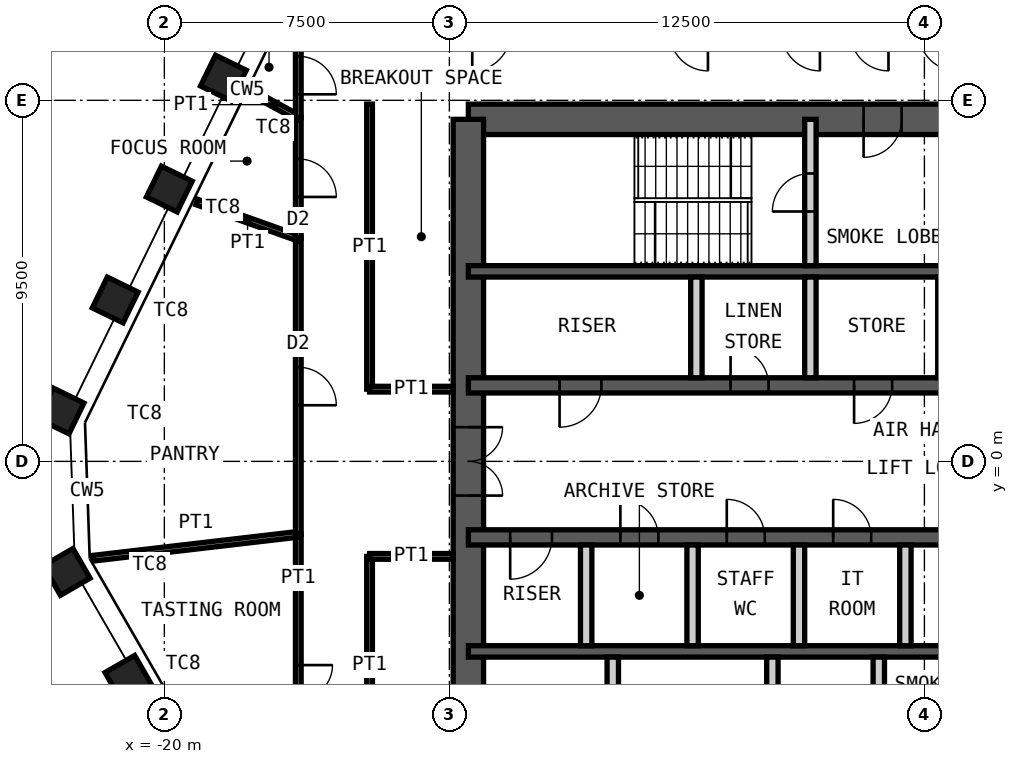
"""IFC4 building model, lengths in metres.
Left out: names, types, materials, properties, quantities, classifications, styles, units other than length and angle.
Written with IfcOpenShell. Run it as: python <this file> out.ifc"""

import sys

from ifc_helpers import new_model, si_unit, direction, frame, frame_2d, origin, origin_2d, place, context, subcontext, project, spatial, rectangle, hollow_rectangle, extrude, element, fill, save


model = new_model("IFC4")
c1 = context("Model", 3, precision=1e-05, world=origin(), true_north=direction((0.0, 1.0)))
c2 = subcontext(c1, "Body", "Model", "MODEL_VIEW")
j1 = project(units=[si_unit("LENGTHUNIT", "METRE"), si_unit("PLANEANGLEUNIT", "RADIAN")], contexts=[c1])
p1 = place(None, origin())
s1 = spatial("IfcSite", under=j1, at=p1, CompositionType="ELEMENT")
p2 = place(p1, origin())
s2 = spatial("IfcBuilding", under=s1, at=p2, CompositionType="ELEMENT")
p3 = place(p2, frame((0.0, 0.0, 316.6)))
s3 = spatial("IfcBuildingStorey", under=s2, at=p3, CompositionType="ELEMENT", Elevation=316.6)
for number, where, z_axis, x_axis in (
    (1, (-20.946, -5.721, 0.0), (0.0, 0.0, 1.0), (0.5, -0.866, 0.0)),
    (2, (-22.57, -2.908, 0.0), (0.0, 0.0, 1.0), (0.5, -0.866, 0.0)),
    (3, (-22.717, 1.327, 0.0), (0.0, 0.0, 1.0), (-0.438, -0.899, 0.0)),
    (4, (-21.293, 4.246, 0.0), (0.0, 0.0, 1.0), (-0.438, -0.899, 0.0)),
    (5, (-19.87, 7.166, 0.0), (0.0, 0.0, 1.0), (-0.438, -0.899, 0.0)),
    (6, (-18.446, 10.085, 0.0), (0.0, 0.0, 1.0), (-0.438, -0.899, 0.0)),
):
    element("IfcColumn", number, at=place(p3, frame(where, z_axis=z_axis, x_axis=x_axis)), inside=s3, PredefinedType="COLUMN", context=c2, shape_type="SweptSolid", body=[
        extrude(hollow_rectangle(XDim=0.9, YDim=0.9, WallThickness=0.05, at=origin_2d()), origin(), (0.0, 0.0, 1.0), 4.2),
    ])
p4 = place(p3, frame((-12.0, 9.0, 0.0), z_axis=(0.0, 0.0, 1.0), x_axis=(1.0, 0.0, 0.0)))
e7 = element("IfcWall", 7, at=p4, inside=s3, PredefinedType="SHEAR", context=c2, shape_type="SweptSolid", body=[
    extrude(rectangle(XDim=24.0, YDim=0.8, at=frame_2d((12.0, 0.0))), origin(), (0.0, 0.0, 1.0), 4.2),
])
p5 = place(p4, frame((10.4, 0.0, 0.0)))
e8 = element("IfcOpeningElement", 8, at=p5, cuts=e7, PredefinedType="OPENING", context=c2, shape_type="SweptSolid", body=[
    extrude(rectangle(XDim=1.0, YDim=2.1, at=frame_2d((0.5, 1.05))), frame((0.0, 0.41, 0.0), z_axis=(0.0, -1.0, 0.0), x_axis=(1.0, 0.0, 0.0)), (0.0, 0.0, 1.0), 0.82),
])
p6 = place(p4, frame((17.6, 0.0, 0.0)))
e9 = element("IfcOpeningElement", 9, at=p6, cuts=e7, PredefinedType="OPENING", context=c2, shape_type="SweptSolid", body=[
    extrude(rectangle(XDim=0.9, YDim=2.1, at=frame_2d((0.45, 1.05))), frame((0.0, 0.41, 0.0), z_axis=(0.0, -1.0, 0.0), x_axis=(1.0, 0.0, 0.0)), (0.0, 0.0, 1.0), 0.82),
])
p7 = place(p4, frame((21.9, 0.0, 0.0)))
e10 = element("IfcOpeningElement", 10, at=p7, cuts=e7, PredefinedType="OPENING", context=c2, shape_type="SweptSolid", body=[
    extrude(rectangle(XDim=0.9, YDim=2.1, at=frame_2d((0.45, 1.05))), frame((0.0, 0.41, 0.0), z_axis=(0.0, -1.0, 0.0), x_axis=(1.0, 0.0, 0.0)), (0.0, 0.0, 1.0), 0.82),
])
p8 = place(p3, frame((-12.0, -9.0, 0.0), z_axis=(0.0, 0.0, 1.0), x_axis=(0.0, 1.0, 0.0)))
e11 = element("IfcWall", 11, at=p8, inside=s3, PredefinedType="SHEAR", context=c2, shape_type="SweptSolid", body=[
    extrude(rectangle(XDim=18.0, YDim=0.8, at=frame_2d((9.0, 0.0))), origin(), (0.0, 0.0, 1.0), 4.2),
])
p9 = place(p8, frame((8.1, 0.0, 0.0)))
e12 = element("IfcOpeningElement", 12, at=p9, cuts=e11, PredefinedType="OPENING", context=c2, shape_type="SweptSolid", body=[
    extrude(rectangle(XDim=1.8, YDim=2.1, at=frame_2d((0.9, 1.05))), frame((0.0, 0.41, 0.0), z_axis=(0.0, -1.0, 0.0), x_axis=(1.0, 0.0, 0.0)), (0.0, 0.0, 1.0), 0.82),
])
p10 = place(p3, frame((-12.0, 5.0, 0.0), z_axis=(0.0, 0.0, 1.0), x_axis=(1.0, 0.0, 0.0)))
e13 = element("IfcWall", 13, at=p10, inside=s3, PredefinedType="SHEAR", context=c2, shape_type="SweptSolid", body=[
    extrude(rectangle(XDim=24.0, YDim=0.3, at=frame_2d((12.0, 0.0))), origin(), (0.0, 0.0, 1.0), 4.2),
])
p11 = place(p3, frame((-12.0, 2.0, 0.0), z_axis=(0.0, 0.0, 1.0), x_axis=(1.0, 0.0, 0.0)))
e14 = element("IfcWall", 14, at=p11, inside=s3, PredefinedType="SHEAR", context=c2, shape_type="SweptSolid", body=[
    extrude(rectangle(XDim=24.0, YDim=0.4, at=frame_2d((12.0, 0.0))), origin(), (0.0, 0.0, 1.0), 4.2),
])
p12 = place(p11, frame((2.4, 0.0, 0.0)))
e15 = element("IfcOpeningElement", 15, at=p12, cuts=e14, PredefinedType="OPENING", context=c2, shape_type="SweptSolid", body=[
    extrude(rectangle(XDim=1.1, YDim=2.1, at=frame_2d((0.55, 1.05))), frame((0.0, 0.21, 0.0), z_axis=(0.0, -1.0, 0.0), x_axis=(1.0, 0.0, 0.0)), (0.0, 0.0, 1.0), 0.42),
])
p13 = place(p11, frame((22.0, 0.0, 0.0)))
e16 = element("IfcOpeningElement", 16, at=p13, cuts=e14, PredefinedType="OPENING", context=c2, shape_type="SweptSolid", body=[
    extrude(rectangle(XDim=1.1, YDim=2.1, at=frame_2d((0.55, 1.05))), frame((0.0, 0.21, 0.0), z_axis=(0.0, -1.0, 0.0), x_axis=(1.0, 0.0, 0.0)), (0.0, 0.0, 1.0), 0.42),
])
p14 = place(p11, frame((10.15, 0.0, 0.0)))
e17 = element("IfcOpeningElement", 17, at=p14, cuts=e14, PredefinedType="OPENING", context=c2, shape_type="SweptSolid", body=[
    extrude(rectangle(XDim=1.0, YDim=2.1, at=frame_2d((0.5, 1.05))), frame((0.0, 0.21, 0.0), z_axis=(0.0, -1.0, 0.0), x_axis=(1.0, 0.0, 0.0)), (0.0, 0.0, 1.0), 0.42),
])
p15 = place(p11, frame((6.9, 0.0, 0.0)))
e18 = element("IfcOpeningElement", 18, at=p15, cuts=e14, PredefinedType="OPENING", context=c2, shape_type="SweptSolid", body=[
    extrude(rectangle(XDim=1.0, YDim=2.1, at=frame_2d((0.5, 1.05))), frame((0.0, 0.21, 0.0), z_axis=(0.0, -1.0, 0.0), x_axis=(1.0, 0.0, 0.0)), (0.0, 0.0, 1.0), 0.42),
])
p16 = place(p11, frame((13.35, 0.0, 0.0)))
e19 = element("IfcOpeningElement", 19, at=p16, cuts=e14, PredefinedType="OPENING", context=c2, shape_type="SweptSolid", body=[
    extrude(rectangle(XDim=1.1, YDim=2.4, at=frame_2d((0.55, 1.2))), frame((0.0, 0.21, 0.0), z_axis=(0.0, -1.0, 0.0), x_axis=(1.0, 0.0, 0.0)), (0.0, 0.0, 1.0), 0.42),
])
p17 = place(p11, frame((16.15, 0.0, 0.0)))
e20 = element("IfcOpeningElement", 20, at=p17, cuts=e14, PredefinedType="OPENING", context=c2, shape_type="SweptSolid", body=[
    extrude(rectangle(XDim=1.1, YDim=2.4, at=frame_2d((0.55, 1.2))), frame((0.0, 0.21, 0.0), z_axis=(0.0, -1.0, 0.0), x_axis=(1.0, 0.0, 0.0)), (0.0, 0.0, 1.0), 0.42),
])
p18 = place(p11, frame((19.0, 0.0, 0.0)))
e21 = element("IfcOpeningElement", 21, at=p18, cuts=e14, PredefinedType="OPENING", context=c2, shape_type="SweptSolid", body=[
    extrude(rectangle(XDim=1.0, YDim=2.1, at=frame_2d((0.5, 1.05))), frame((0.0, 0.21, 0.0), z_axis=(0.0, -1.0, 0.0), x_axis=(1.0, 0.0, 0.0)), (0.0, 0.0, 1.0), 0.42),
])
p19 = place(p3, frame((-12.0, -2.0, 0.0), z_axis=(0.0, 0.0, 1.0), x_axis=(1.0, 0.0, 0.0)))
e22 = element("IfcWall", 22, at=p19, inside=s3, PredefinedType="SHEAR", context=c2, shape_type="SweptSolid", body=[
    extrude(rectangle(XDim=24.0, YDim=0.4, at=frame_2d((12.0, 0.0))), origin(), (0.0, 0.0, 1.0), 4.2),
])
p20 = place(p19, frame((1.1, 0.0, 0.0)))
e23 = element("IfcOpeningElement", 23, at=p20, cuts=e22, PredefinedType="OPENING", context=c2, shape_type="SweptSolid", body=[
    extrude(rectangle(XDim=1.1, YDim=2.1, at=frame_2d((0.55, 1.05))), frame((0.0, 0.21, 0.0), z_axis=(0.0, -1.0, 0.0), x_axis=(1.0, 0.0, 0.0)), (0.0, 0.0, 1.0), 0.42),
])
p21 = place(p19, frame((13.55, 0.0, 0.0)))
e24 = element("IfcOpeningElement", 24, at=p21, cuts=e22, PredefinedType="OPENING", context=c2, shape_type="SweptSolid", body=[
    extrude(rectangle(XDim=1.1, YDim=2.1, at=frame_2d((0.55, 1.05))), frame((0.0, 0.21, 0.0), z_axis=(0.0, -1.0, 0.0), x_axis=(1.0, 0.0, 0.0)), (0.0, 0.0, 1.0), 0.42),
])
p22 = place(p19, frame((20.7, 0.0, 0.0)))
e25 = element("IfcOpeningElement", 25, at=p22, cuts=e22, PredefinedType="OPENING", context=c2, shape_type="SweptSolid", body=[
    extrude(rectangle(XDim=1.1, YDim=2.1, at=frame_2d((0.55, 1.05))), frame((0.0, 0.21, 0.0), z_axis=(0.0, -1.0, 0.0), x_axis=(1.0, 0.0, 0.0)), (0.0, 0.0, 1.0), 0.42),
])
p23 = place(p19, frame((4.0, 0.0, 0.0)))
e26 = element("IfcOpeningElement", 26, at=p23, cuts=e22, PredefinedType="OPENING", context=c2, shape_type="SweptSolid", body=[
    extrude(rectangle(XDim=1.0, YDim=2.1, at=frame_2d((0.5, 1.05))), frame((0.0, 0.21, 0.0), z_axis=(0.0, -1.0, 0.0), x_axis=(1.0, 0.0, 0.0)), (0.0, 0.0, 1.0), 0.42),
])
p24 = place(p19, frame((6.8, 0.0, 0.0)))
e27 = element("IfcOpeningElement", 27, at=p24, cuts=e22, PredefinedType="OPENING", context=c2, shape_type="SweptSolid", body=[
    extrude(rectangle(XDim=1.0, YDim=2.1, at=frame_2d((0.5, 1.05))), frame((0.0, 0.21, 0.0), z_axis=(0.0, -1.0, 0.0), x_axis=(1.0, 0.0, 0.0)), (0.0, 0.0, 1.0), 0.42),
])
p25 = place(p19, frame((9.6, 0.0, 0.0)))
e28 = element("IfcOpeningElement", 28, at=p25, cuts=e22, PredefinedType="OPENING", context=c2, shape_type="SweptSolid", body=[
    extrude(rectangle(XDim=1.0, YDim=2.1, at=frame_2d((0.5, 1.05))), frame((0.0, 0.21, 0.0), z_axis=(0.0, -1.0, 0.0), x_axis=(1.0, 0.0, 0.0)), (0.0, 0.0, 1.0), 0.42),
])
p26 = place(p3, frame((-12.0, -5.0, 0.0), z_axis=(0.0, 0.0, 1.0), x_axis=(1.0, 0.0, 0.0)))
e29 = element("IfcWall", 29, at=p26, inside=s3, PredefinedType="SHEAR", context=c2, shape_type="SweptSolid", body=[
    extrude(rectangle(XDim=24.0, YDim=0.3, at=frame_2d((12.0, 0.0))), origin(), (0.0, 0.0, 1.0), 4.2),
])
p27 = place(p3, frame((-3.0, 5.15, 0.0), z_axis=(0.0, 0.0, 1.0), x_axis=(0.0, 1.0, 0.0)))
e30 = element("IfcWall", 30, at=p27, inside=s3, PredefinedType="PARTITIONING", context=c2, shape_type="SweptSolid", body=[
    extrude(rectangle(XDim=3.85, YDim=0.3, at=frame_2d((1.925, 0.0))), origin(), (0.0, 0.0, 1.0), 3.98),
])
p28 = place(p27, frame((1.425, 0.0, 0.0)))
e31 = element("IfcOpeningElement", 31, at=p28, cuts=e30, PredefinedType="OPENING", context=c2, shape_type="SweptSolid", body=[
    extrude(rectangle(XDim=1.0, YDim=2.1, at=frame_2d((0.5, 1.05))), frame((0.0, 0.16, 0.0), z_axis=(0.0, -1.0, 0.0), x_axis=(1.0, 0.0, 0.0)), (0.0, 0.0, 1.0), 0.32),
])
for number, where, z_axis, x_axis in (
    (32, (-6.0, 2.2, 0.0), (0.0, 0.0, 1.0), (0.0, 1.0, 0.0)),
    (33, (-3.0, 2.2, 0.0), (0.0, 0.0, 1.0), (0.0, 1.0, 0.0)),
    (34, (0.5, 2.2, 0.0), (0.0, 0.0, 1.0), (0.0, 1.0, 0.0)),
    (35, (-8.9, -4.85, 0.0), (0.0, 0.0, 1.0), (0.0, 1.0, 0.0)),
    (36, (-6.1, -4.85, 0.0), (0.0, 0.0, 1.0), (0.0, 1.0, 0.0)),
    (37, (-3.3, -4.85, 0.0), (0.0, 0.0, 1.0), (0.0, 1.0, 0.0)),
    (38, (-0.5, -4.85, 0.0), (0.0, 0.0, 1.0), (0.0, 1.0, 0.0)),
):
    element("IfcWall", number, at=place(p3, frame(where, z_axis=z_axis, x_axis=x_axis)), inside=s3, PredefinedType="PARTITIONING", context=c2, shape_type="SweptSolid", body=[
        extrude(rectangle(XDim=2.65, YDim=0.3, at=frame_2d((1.325, 0.0))), origin(), (0.0, 0.0, 1.0), 3.98),
    ])
for number, where, z_axis, x_axis in (
    (39, (-8.2, -9.0, 0.0), (0.0, 0.0, 1.0), (0.0, 1.0, 0.0)),
    (40, (-4.0, -9.0, 0.0), (0.0, 0.0, 1.0), (0.0, 1.0, 0.0)),
):
    element("IfcWall", number, at=place(p3, frame(where, z_axis=z_axis, x_axis=x_axis)), inside=s3, PredefinedType="PARTITIONING", context=c2, shape_type="SweptSolid", body=[
        extrude(rectangle(XDim=3.85, YDim=0.3, at=frame_2d((1.925, 0.0))), origin(), (0.0, 0.0, 1.0), 3.98),
    ])
p29 = place(p3, frame((-1.2, -9.0, 0.0), z_axis=(0.0, 0.0, 1.0), x_axis=(0.0, 1.0, 0.0)))
e41 = element("IfcWall", 41, at=p29, inside=s3, PredefinedType="PARTITIONING", context=c2, shape_type="SweptSolid", body=[
    extrude(rectangle(XDim=3.85, YDim=0.3, at=frame_2d((1.925, 0.0))), origin(), (0.0, 0.0, 1.0), 3.98),
])
p30 = place(p29, frame((1.375, 0.0, 0.0)))
e42 = element("IfcOpeningElement", 42, at=p30, cuts=e41, PredefinedType="OPENING", context=c2, shape_type="SweptSolid", body=[
    extrude(rectangle(XDim=1.1, YDim=2.4, at=frame_2d((0.55, 1.2))), frame((0.0, 0.16, 0.0), z_axis=(0.0, -1.0, 0.0), x_axis=(1.0, 0.0, 0.0)), (0.0, 0.0, 1.0), 0.32),
])
p31 = place(p3, frame((-16.475, -10.601, 0.0), z_axis=(0.0, 0.0, 1.0), x_axis=(0.0, 1.0, 0.0)))
e43 = element("IfcWall", 43, at=p31, inside=s3, PredefinedType="PARTITIONING", context=c2, shape_type="SweptSolid", body=[
    extrude(rectangle(XDim=8.681, YDim=0.15, at=frame_2d((4.341, 0.0))), origin(), (0.0, 0.0, 1.0), 4.03),
])
p32 = place(p31, frame((3.441, 0.0, 0.0)))
e44 = element("IfcOpeningElement", 44, at=p32, cuts=e43, PredefinedType="OPENING", context=c2, shape_type="SweptSolid", body=[
    extrude(rectangle(XDim=1.8, YDim=2.4, at=frame_2d((0.9, 1.2))), frame((0.0, 0.085, 0.0), z_axis=(0.0, -1.0, 0.0), x_axis=(1.0, 0.0, 0.0)), (0.0, 0.0, 1.0), 0.17),
])
p33 = place(p3, frame((-21.864, -2.547, 0.0), z_axis=(0.0, 0.0, 1.0), x_axis=(0.993284789299, 0.115694975458, 0.0)))
e45 = element("IfcWall", 45, at=p33, inside=s3, PredefinedType="PARTITIONING", context=c2, shape_type="SweptSolid", body=[
    extrude(rectangle(XDim=5.425, YDim=0.15, at=frame_2d((2.713, 0.0))), origin(), (0.0, 0.0, 1.0), 2.93),
])
p34 = place(p3, frame((-16.475, -1.919, 0.0), z_axis=(0.0, 0.0, 1.0), x_axis=(0.0, 1.0, 0.0)))
e46 = element("IfcWall", 46, at=p34, inside=s3, PredefinedType="PARTITIONING", context=c2, shape_type="SweptSolid", body=[
    extrude(rectangle(XDim=7.792, YDim=0.15, at=frame_2d((3.896, 0.0))), origin(), (0.0, 0.0, 1.0), 4.03),
])
p35 = place(p34, frame((3.396, 0.0, 0.0)))
e47 = element("IfcOpeningElement", 47, at=p35, cuts=e46, PredefinedType="OPENING", context=c2, shape_type="SweptSolid", body=[
    extrude(rectangle(XDim=1.0, YDim=2.4, at=frame_2d((0.5, 1.2))), frame((0.0, 0.085, 0.0), z_axis=(0.0, -1.0, 0.0), x_axis=(1.0, 0.0, 0.0)), (0.0, 0.0, 1.0), 0.17),
])
p36 = place(p3, frame((-19.146, 6.825, 0.0), z_axis=(0.0, 0.0, 1.0), x_axis=(0.94194625765, -0.335763678351, 0.0)))
e48 = element("IfcWall", 48, at=p36, inside=s3, PredefinedType="PARTITIONING", context=c2, shape_type="SweptSolid", body=[
    extrude(rectangle(XDim=2.836, YDim=0.15, at=frame_2d((1.418, 0.0))), origin(), (0.0, 0.0, 1.0), 3.33),
])
p37 = place(p3, frame((-16.475, 5.873, 0.0), z_axis=(0.0, 0.0, 1.0), x_axis=(0.0, 1.0, 0.0)))
e49 = element("IfcWall", 49, at=p37, inside=s3, PredefinedType="PARTITIONING", context=c2, shape_type="SweptSolid", body=[
    extrude(rectangle(XDim=3.169, YDim=0.15, at=frame_2d((1.584, 0.0))), origin(), (0.0, 0.0, 1.0), 4.03),
])
p38 = place(p37, frame((1.084, 0.0, 0.0)))
e50 = element("IfcOpeningElement", 50, at=p38, cuts=e49, PredefinedType="OPENING", context=c2, shape_type="SweptSolid", body=[
    extrude(rectangle(XDim=1.0, YDim=2.4, at=frame_2d((0.5, 1.2))), frame((0.0, 0.085, 0.0), z_axis=(0.0, -1.0, 0.0), x_axis=(1.0, 0.0, 0.0)), (0.0, 0.0, 1.0), 0.17),
])
p39 = place(p3, frame((-17.729, 9.73, 0.0), z_axis=(0.0, 0.0, 1.0), x_axis=(0.876633607687, -0.481158516369, 0.0)))
e51 = element("IfcWall", 51, at=p39, inside=s3, PredefinedType="PARTITIONING", context=c2, shape_type="SweptSolid", body=[
    extrude(rectangle(XDim=1.43, YDim=0.15, at=frame_2d((0.715, 0.0))), origin(), (0.0, 0.0, 1.0), 3.33),
])
p40 = place(p3, frame((-16.475, 9.042, 0.0), z_axis=(0.0, 0.0, 1.0), x_axis=(0.0, 1.0, 0.0)))
e52 = element("IfcWall", 52, at=p40, inside=s3, PredefinedType="PARTITIONING", context=c2, shape_type="SweptSolid", body=[
    extrude(rectangle(XDim=2.233, YDim=0.15, at=frame_2d((1.117, 0.0))), origin(), (0.0, 0.0, 1.0), 4.03),
])
p41 = place(p40, frame((0.617, 0.0, 0.0)))
e53 = element("IfcOpeningElement", 53, at=p41, cuts=e52, PredefinedType="OPENING", context=c2, shape_type="SweptSolid", body=[
    extrude(rectangle(XDim=1.0, YDim=2.4, at=frame_2d((0.5, 1.2))), frame((0.0, 0.085, 0.0), z_axis=(0.0, -1.0, 0.0), x_axis=(1.0, 0.0, 0.0)), (0.0, 0.0, 1.0), 0.17),
])
p42 = place(p3, frame((-14.6, 1.9, 0.0), z_axis=(0.0, 0.0, 1.0), x_axis=(0.0, 1.0, 0.0)))
e54 = element("IfcWall", 54, at=p42, inside=s3, PredefinedType="PARTITIONING", context=c2, shape_type="SweptSolid", body=[
    extrude(rectangle(XDim=7.5, YDim=0.15, at=frame_2d((3.75, 0.0))), origin(), (0.0, 0.0, 1.0), 4.03),
])
p43 = place(p3, frame((-12.4, 1.9, 0.0), z_axis=(0.0, 0.0, 1.0), x_axis=(-1.0, 0.0, 0.0)))
e55 = element("IfcWall", 55, at=p43, inside=s3, PredefinedType="PARTITIONING", context=c2, shape_type="SweptSolid", body=[
    extrude(rectangle(XDim=2.2, YDim=0.15, at=frame_2d((1.1, 0.0))), origin(), (0.0, 0.0, 1.0), 3.53),
])
p44 = place(p3, frame((-14.6, -9.4, 0.0), z_axis=(0.0, 0.0, 1.0), x_axis=(0.0, 1.0, 0.0)))
e56 = element("IfcWall", 56, at=p44, inside=s3, PredefinedType="PARTITIONING", context=c2, shape_type="SweptSolid", body=[
    extrude(rectangle(XDim=6.9, YDim=0.15, at=frame_2d((3.45, 0.0))), origin(), (0.0, 0.0, 1.0), 4.03),
])
p45 = place(p3, frame((-12.4, -2.5, 0.0), z_axis=(0.0, 0.0, 1.0), x_axis=(-1.0, 0.0, 0.0)))
e57 = element("IfcWall", 57, at=p45, inside=s3, PredefinedType="PARTITIONING", context=c2, shape_type="SweptSolid", body=[
    extrude(rectangle(XDim=2.2, YDim=0.15, at=frame_2d((1.1, 0.0))), origin(), (0.0, 0.0, 1.0), 3.53),
])
p46 = place(p5, origin())
e58 = element("IfcDoor", 58, at=p46, inside=s3, OperationType="SINGLE_SWING_LEFT", PredefinedType="DOOR", context=c2, shape_type="SweptSolid", body=[
    extrude(rectangle(XDim=1.0, YDim=2.1, at=frame_2d((0.5, 1.05))), frame((0.0, 0.025, 0.0), z_axis=(0.0, -1.0, 0.0), x_axis=(1.0, 0.0, 0.0)), (0.0, 0.0, 1.0), 0.05),
])
fill(e8, e58)
p47 = place(p28, origin())
e59 = element("IfcDoor", 59, at=p47, inside=s3, OperationType="SINGLE_SWING_RIGHT", PredefinedType="DOOR", context=c2, shape_type="SweptSolid", body=[
    extrude(rectangle(XDim=1.0, YDim=2.1, at=frame_2d((0.5, 1.05))), frame((0.0, 0.025, 0.0), z_axis=(0.0, -1.0, 0.0), x_axis=(1.0, 0.0, 0.0)), (0.0, 0.0, 1.0), 0.05),
])
fill(e31, e59)
p48 = place(p12, origin())
e60 = element("IfcDoor", 60, at=p48, inside=s3, OperationType="SINGLE_SWING_LEFT", PredefinedType="DOOR", context=c2, shape_type="SweptSolid", body=[
    extrude(rectangle(XDim=1.1, YDim=2.1, at=frame_2d((0.55, 1.05))), frame((0.0, 0.025, 0.0), z_axis=(0.0, -1.0, 0.0), x_axis=(1.0, 0.0, 0.0)), (0.0, 0.0, 1.0), 0.05),
])
fill(e15, e60)
p49 = place(p20, origin())
e61 = element("IfcDoor", 61, at=p49, inside=s3, OperationType="SINGLE_SWING_LEFT", PredefinedType="DOOR", context=c2, shape_type="SweptSolid", body=[
    extrude(rectangle(XDim=1.1, YDim=2.1, at=frame_2d((0.55, 1.05))), frame((0.0, 0.025, 0.0), z_axis=(0.0, -1.0, 0.0), x_axis=(1.0, 0.0, 0.0)), (0.0, 0.0, 1.0), 0.05),
])
fill(e23, e61)
p50 = place(p14, origin())
e62 = element("IfcDoor", 62, at=p50, inside=s3, OperationType="SINGLE_SWING_LEFT", PredefinedType="DOOR", context=c2, shape_type="SweptSolid", body=[
    extrude(rectangle(XDim=1.0, YDim=2.1, at=frame_2d((0.5, 1.05))), frame((0.0, 0.025, 0.0), z_axis=(0.0, -1.0, 0.0), x_axis=(1.0, 0.0, 0.0)), (0.0, 0.0, 1.0), 0.05),
])
fill(e17, e62)
p51 = place(p9, origin())
e63 = element("IfcDoor", 63, at=p51, inside=s3, OperationType="DOUBLE_DOOR_DOUBLE_SWING", PredefinedType="DOOR", context=c2, shape_type="SweptSolid", body=[
    extrude(rectangle(XDim=1.8, YDim=2.1, at=frame_2d((0.9, 1.05))), frame((0.0, 0.025, 0.0), z_axis=(0.0, -1.0, 0.0), x_axis=(1.0, 0.0, 0.0)), (0.0, 0.0, 1.0), 0.05),
])
fill(e12, e63)
p52 = place(p15, origin())
e64 = element("IfcDoor", 64, at=p52, inside=s3, OperationType="SINGLE_SWING_RIGHT", PredefinedType="DOOR", context=c2, shape_type="SweptSolid", body=[
    extrude(rectangle(XDim=1.0, YDim=2.1, at=frame_2d((0.5, 1.05))), frame((0.0, 0.025, 0.0), z_axis=(0.0, -1.0, 0.0), x_axis=(1.0, 0.0, 0.0)), (0.0, 0.0, 1.0), 0.05),
])
fill(e18, e64)
p53 = place(p23, origin())
e65 = element("IfcDoor", 65, at=p53, inside=s3, OperationType="SINGLE_SWING_RIGHT", PredefinedType="DOOR", context=c2, shape_type="SweptSolid", body=[
    extrude(rectangle(XDim=1.0, YDim=2.1, at=frame_2d((0.5, 1.05))), frame((0.0, 0.025, 0.0), z_axis=(0.0, -1.0, 0.0), x_axis=(1.0, 0.0, 0.0)), (0.0, 0.0, 1.0), 0.05),
])
fill(e26, e65)
p54 = place(p24, origin())
e66 = element("IfcDoor", 66, at=p54, inside=s3, OperationType="SINGLE_SWING_RIGHT", PredefinedType="DOOR", context=c2, shape_type="SweptSolid", body=[
    extrude(rectangle(XDim=1.0, YDim=2.1, at=frame_2d((0.5, 1.05))), frame((0.0, 0.025, 0.0), z_axis=(0.0, -1.0, 0.0), x_axis=(1.0, 0.0, 0.0)), (0.0, 0.0, 1.0), 0.05),
])
fill(e27, e66)
p55 = place(p25, origin())
e67 = element("IfcDoor", 67, at=p55, inside=s3, OperationType="SINGLE_SWING_RIGHT", PredefinedType="DOOR", context=c2, shape_type="SweptSolid", body=[
    extrude(rectangle(XDim=1.0, YDim=2.1, at=frame_2d((0.5, 1.05))), frame((0.0, 0.025, 0.0), z_axis=(0.0, -1.0, 0.0), x_axis=(1.0, 0.0, 0.0)), (0.0, 0.0, 1.0), 0.05),
])
fill(e28, e67)
p56 = place(p32, origin())
e68 = element("IfcDoor", 68, at=p56, inside=s3, OperationType="DOUBLE_DOOR_DOUBLE_SWING", PredefinedType="DOOR", context=c2, shape_type="SweptSolid", body=[
    extrude(rectangle(XDim=1.8, YDim=2.4, at=frame_2d((0.9, 1.2))), frame((0.0, 0.025, 0.0), z_axis=(0.0, -1.0, 0.0), x_axis=(1.0, 0.0, 0.0)), (0.0, 0.0, 1.0), 0.05),
])
fill(e44, e68)
p57 = place(p35, origin())
e69 = element("IfcDoor", 69, at=p57, inside=s3, OperationType="SINGLE_SWING_LEFT", PredefinedType="DOOR", context=c2, shape_type="SweptSolid", body=[
    extrude(rectangle(XDim=1.0, YDim=2.4, at=frame_2d((0.5, 1.2))), frame((0.0, 0.025, 0.0), z_axis=(0.0, -1.0, 0.0), x_axis=(1.0, 0.0, 0.0)), (0.0, 0.0, 1.0), 0.05),
])
fill(e47, e69)
p58 = place(p38, origin())
e70 = element("IfcDoor", 70, at=p58, inside=s3, OperationType="SINGLE_SWING_LEFT", PredefinedType="DOOR", context=c2, shape_type="SweptSolid", body=[
    extrude(rectangle(XDim=1.0, YDim=2.4, at=frame_2d((0.5, 1.2))), frame((0.0, 0.025, 0.0), z_axis=(0.0, -1.0, 0.0), x_axis=(1.0, 0.0, 0.0)), (0.0, 0.0, 1.0), 0.05),
])
fill(e50, e70)
p59 = place(p41, origin())
e71 = element("IfcDoor", 71, at=p59, inside=s3, OperationType="SINGLE_SWING_LEFT", PredefinedType="DOOR", context=c2, shape_type="SweptSolid", body=[
    extrude(rectangle(XDim=1.0, YDim=2.4, at=frame_2d((0.5, 1.2))), frame((0.0, 0.025, 0.0), z_axis=(0.0, -1.0, 0.0), x_axis=(1.0, 0.0, 0.0)), (0.0, 0.0, 1.0), 0.05),
])
fill(e53, e71)
save(model, sys.argv[1])
